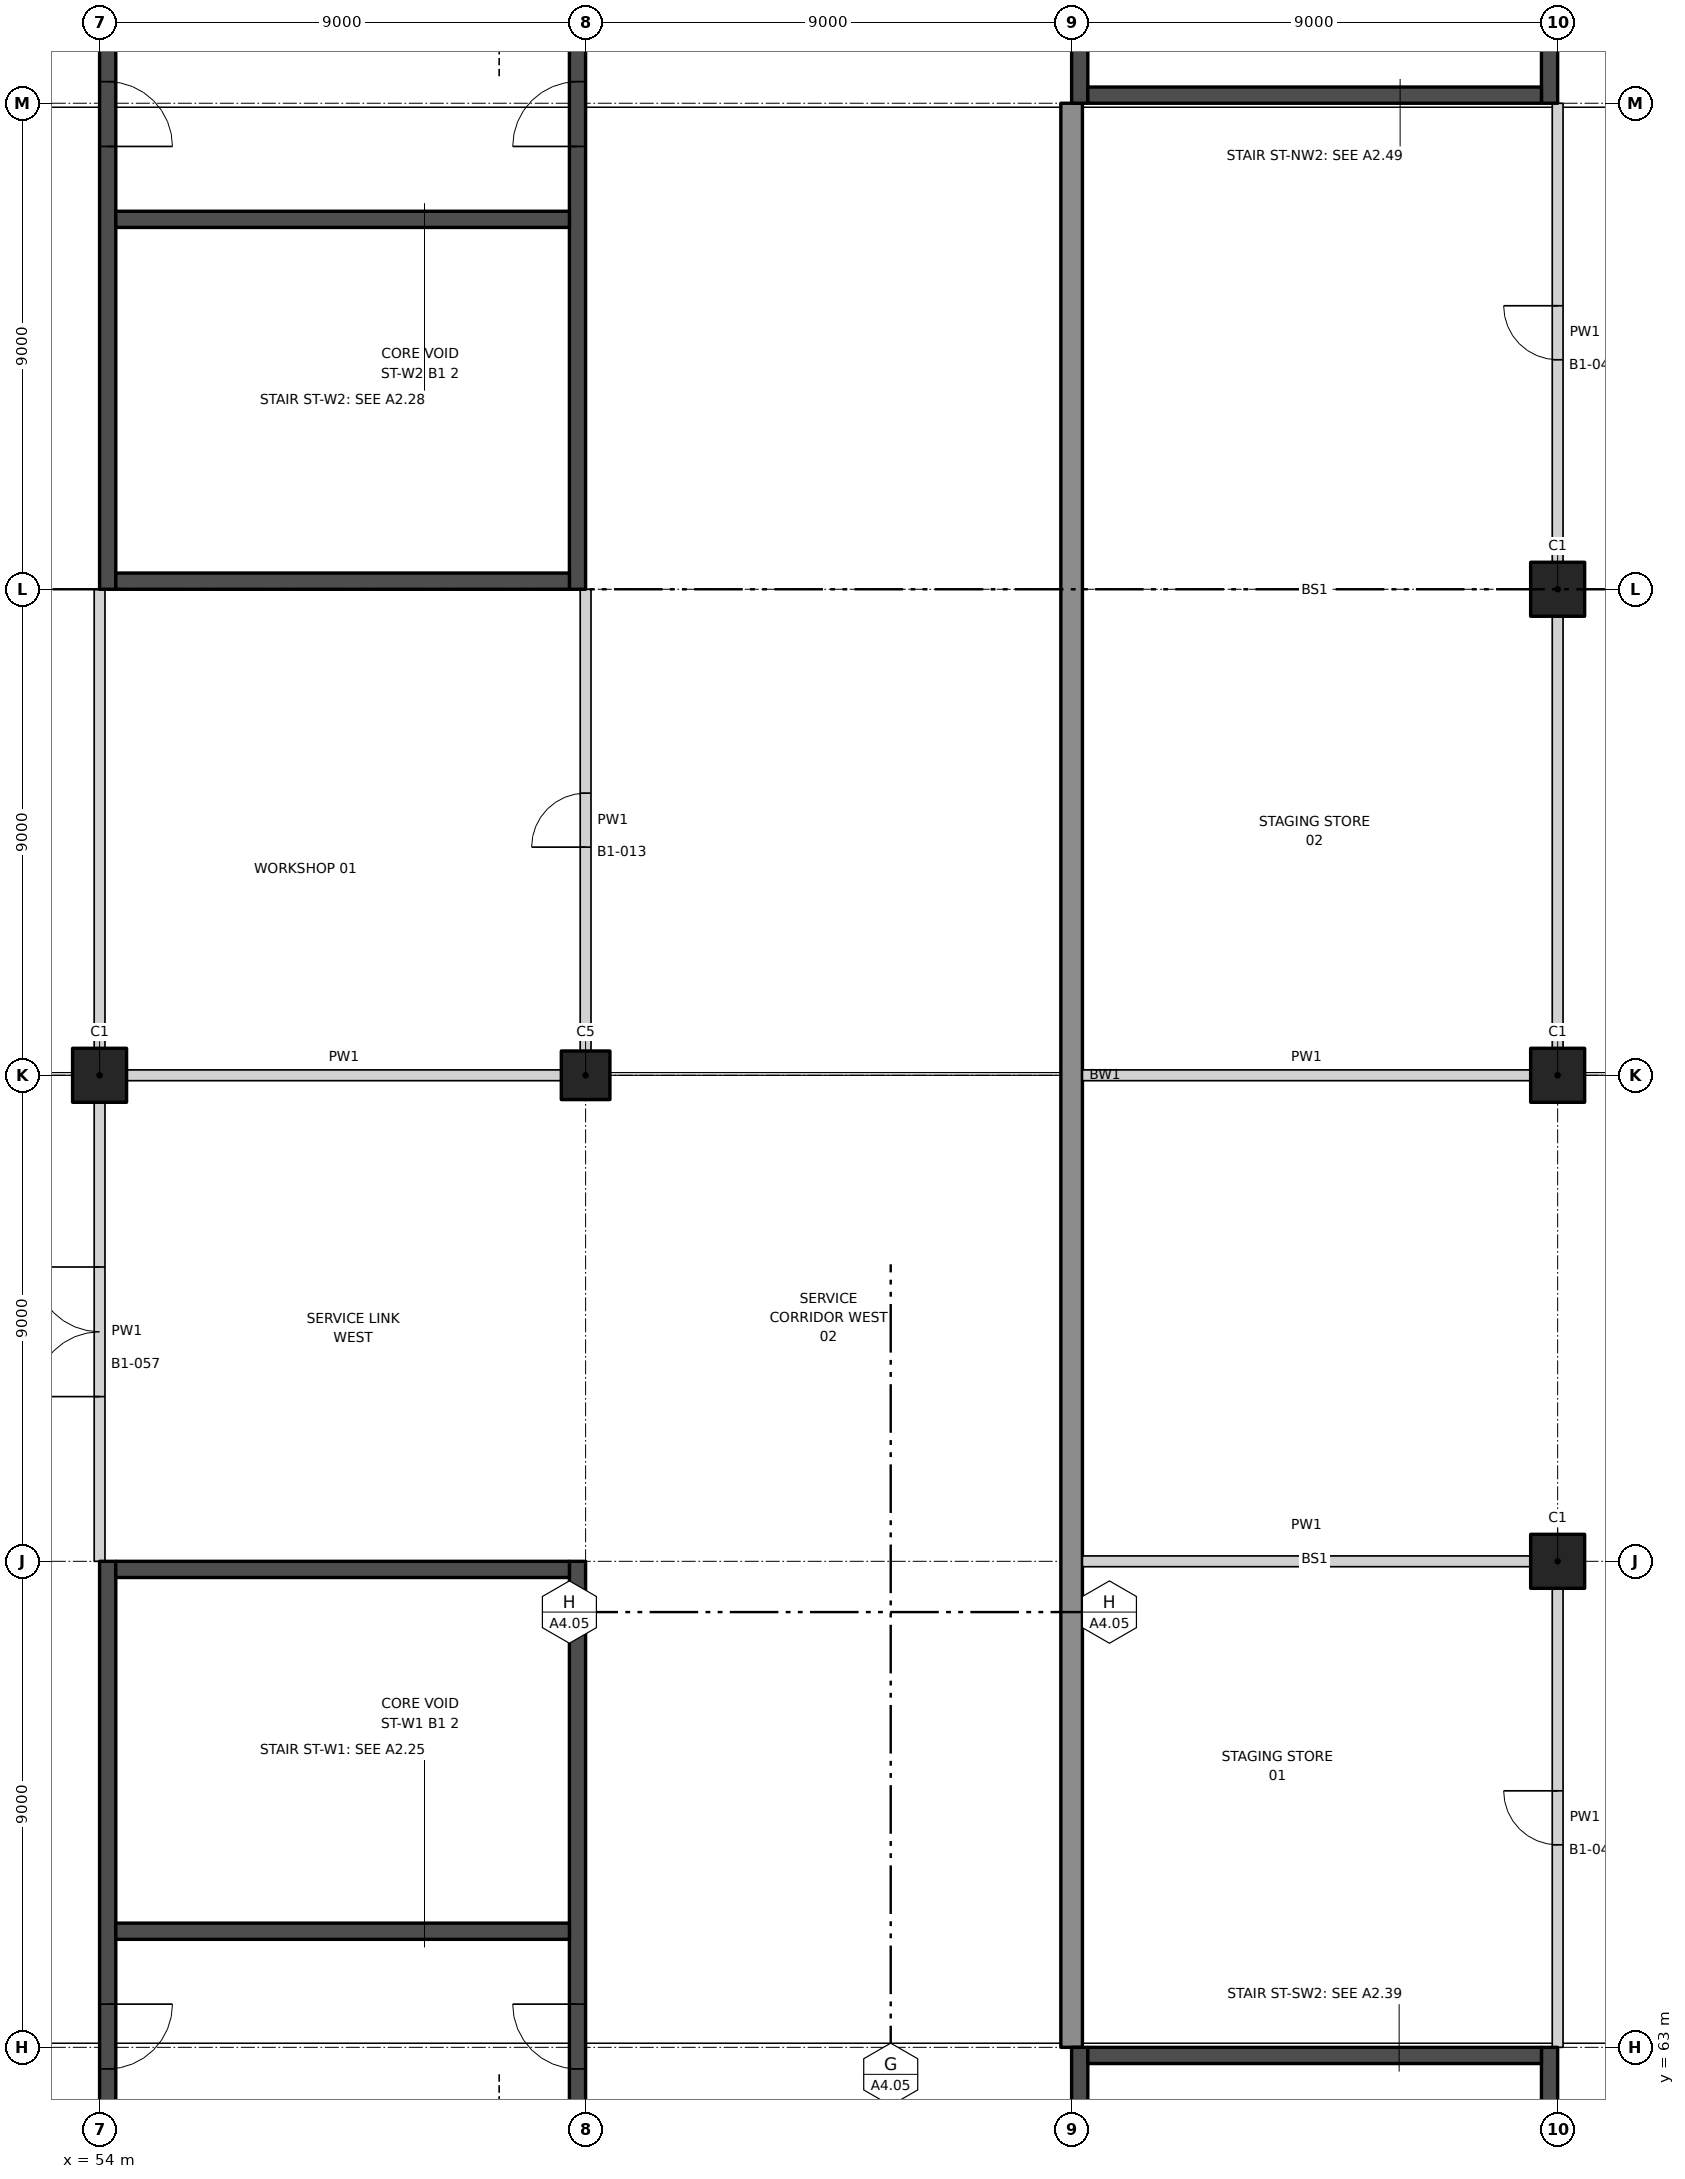
"""IFC4 building model, lengths in metres.
Left out: names, types, materials, properties, quantities, classifications, styles, units other than length and angle.
Written with IfcOpenShell. Run it as: python <this file> out.ifc"""

import sys

from ifc_helpers import new_model, si_unit, direction, frame, frame_2d, origin, origin_2d, place, context, subcontext, project, spatial, rectangle, extrude, element, fill, save


model = new_model("IFC4")
c1 = context("Model", 3, precision=1e-05, world=origin(), true_north=direction((0.0, 1.0)))
c2 = subcontext(c1, "Body", "Model", "MODEL_VIEW")
j1 = project(units=[si_unit("LENGTHUNIT", "METRE"), si_unit("PLANEANGLEUNIT", "RADIAN")], contexts=[c1])
p1 = place(None, origin())
s1 = spatial("IfcSite", under=j1, at=p1, CompositionType="ELEMENT")
p2 = place(p1, origin())
s2 = spatial("IfcBuilding", under=s1, at=p2, CompositionType="ELEMENT")
p3 = place(p2, frame((0.0, 0.0, -6.0)))
s3 = spatial("IfcBuildingStorey", under=s2, at=p3, CompositionType="ELEMENT", Elevation=-6.0)
p4 = place(p3, frame((54.0, 81.0, 0.0), z_axis=(0.0, 0.0, 1.0), x_axis=(1.0, 0.0, 0.0)))
e1 = element("IfcColumn", 1, at=p4, inside=s3, PredefinedType="COLUMN", context=c2, shape_type="SweptSolid", body=[
    extrude(rectangle(XDim=1.0, YDim=1.0, at=origin_2d()), origin(), (0.0, 0.0, 1.0), 6.0),
])
p5 = place(p3, frame((63.0, 81.0, 0.0), z_axis=(0.0, 0.0, 1.0), x_axis=(1.0, 0.0, 0.0)))
e2 = element("IfcColumn", 2, at=p5, inside=s3, PredefinedType="COLUMN", context=c2, shape_type="SweptSolid", body=[
    extrude(rectangle(XDim=0.9, YDim=0.9, at=origin_2d()), origin(), (0.0, 0.0, 1.0), 6.0),
])
for number, where, z_axis, x_axis in (
    (3, (81.0, 72.0, 0.0), (0.0, 0.0, 1.0), (1.0, 0.0, 0.0)),
    (4, (81.0, 81.0, 0.0), (0.0, 0.0, 1.0), (1.0, 0.0, 0.0)),
    (5, (81.0, 90.0, 0.0), (0.0, 0.0, 1.0), (1.0, 0.0, 0.0)),
):
    element("IfcColumn", number, at=place(p3, frame(where, z_axis=z_axis, x_axis=x_axis)), inside=s3, PredefinedType="COLUMN", context=c2, shape_type="SweptSolid", body=[
        extrude(rectangle(XDim=1.0, YDim=1.0, at=origin_2d()), origin(), (0.0, 0.0, 1.0), 6.0),
    ])
p6 = place(p3, frame((72.0, 99.0, 0.0), z_axis=(0.0, 0.0, 1.0), x_axis=(0.0, -1.0, 0.0)))
e6 = element("IfcWall", 6, at=p6, inside=s3, PredefinedType="SOLIDWALL", context=c2, shape_type="SweptSolid", body=[
    extrude(rectangle(XDim=36.0, YDim=0.4, at=frame_2d((18.0, 0.0))), origin(), (0.0, 0.0, 1.0), 6.0),
])
p7 = place(p3, frame((72.2, 72.0, 0.0), z_axis=(0.0, 0.0, 1.0), x_axis=(1.0, 0.0, 0.0)))
e7 = element("IfcWall", 7, at=p7, inside=s3, PredefinedType="PARTITIONING", context=c2, shape_type="SweptSolid", body=[
    extrude(rectangle(XDim=8.3, YDim=0.2, at=frame_2d((4.15, 0.0))), origin(), (0.0, 0.0, 1.0), 4.65),
])
p8 = place(p3, frame((54.5, 81.0, 0.0), z_axis=(0.0, 0.0, 1.0), x_axis=(1.0, 0.0, 0.0)))
e8 = element("IfcWall", 8, at=p8, inside=s3, PredefinedType="PARTITIONING", context=c2, shape_type="SweptSolid", body=[
    extrude(rectangle(XDim=8.05, YDim=0.2, at=frame_2d((4.025, 0.0))), origin(), (0.0, 0.0, 1.0), 4.65),
])
p9 = place(p3, frame((72.2, 81.0, 0.0), z_axis=(0.0, 0.0, 1.0), x_axis=(1.0, 0.0, 0.0)))
e9 = element("IfcWall", 9, at=p9, inside=s3, PredefinedType="PARTITIONING", context=c2, shape_type="SweptSolid", body=[
    extrude(rectangle(XDim=8.3, YDim=0.2, at=frame_2d((4.15, 0.0))), origin(), (0.0, 0.0, 1.0), 4.65),
])
p10 = place(p3, frame((54.0, 72.0, 0.0), z_axis=(0.0, 0.0, 1.0), x_axis=(0.0, 1.0, 0.0)))
e10 = element("IfcWall", 10, at=p10, inside=s3, PredefinedType="PARTITIONING", context=c2, shape_type="SweptSolid", body=[
    extrude(rectangle(XDim=8.5, YDim=0.2, at=frame_2d((4.25, 0.0))), origin(), (0.0, 0.0, 1.0), 4.65),
])
p11 = place(p10, frame((3.05, 0.0, 0.0)))
e11 = element("IfcOpeningElement", 11, at=p11, cuts=e10, PredefinedType="OPENING", context=c2, shape_type="SweptSolid", body=[
    extrude(rectangle(XDim=2.4, YDim=2.4, at=frame_2d((1.2, 1.2))), frame((0.0, 0.11, 0.0), z_axis=(0.0, -1.0, 0.0), x_axis=(1.0, 0.0, 0.0)), (0.0, 0.0, 1.0), 0.22),
])
p12 = place(p3, frame((54.0, 81.5, 0.0), z_axis=(0.0, 0.0, 1.0), x_axis=(0.0, 1.0, 0.0)))
e12 = element("IfcWall", 12, at=p12, inside=s3, PredefinedType="PARTITIONING", context=c2, shape_type="SweptSolid", body=[
    extrude(rectangle(XDim=8.5, YDim=0.2, at=frame_2d((4.25, 0.0))), origin(), (0.0, 0.0, 1.0), 4.65),
])
p13 = place(p3, frame((63.0, 81.45, 0.0), z_axis=(0.0, 0.0, 1.0), x_axis=(0.0, 1.0, 0.0)))
e13 = element("IfcWall", 13, at=p13, inside=s3, PredefinedType="PARTITIONING", context=c2, shape_type="SweptSolid", body=[
    extrude(rectangle(XDim=8.55, YDim=0.2, at=frame_2d((4.275, 0.0))), origin(), (0.0, 0.0, 1.0), 4.55),
])
p14 = place(p13, frame((3.775, 0.0, 0.0)))
e14 = element("IfcOpeningElement", 14, at=p14, cuts=e13, PredefinedType="OPENING", context=c2, shape_type="SweptSolid", body=[
    extrude(rectangle(XDim=1.0, YDim=2.1, at=frame_2d((0.5, 1.05))), frame((0.0, 0.11, 0.0), z_axis=(0.0, -1.0, 0.0), x_axis=(1.0, 0.0, 0.0)), (0.0, 0.0, 1.0), 0.22),
])
p15 = place(p3, frame((81.0, 63.0, 0.0), z_axis=(0.0, 0.0, 1.0), x_axis=(0.0, 1.0, 0.0)))
e15 = element("IfcWall", 15, at=p15, inside=s3, PredefinedType="PARTITIONING", context=c2, shape_type="SweptSolid", body=[
    extrude(rectangle(XDim=8.5, YDim=0.2, at=frame_2d((4.25, 0.0))), origin(), (0.0, 0.0, 1.0), 4.55),
])
p16 = place(p15, frame((3.75, 0.0, 0.0)))
e16 = element("IfcOpeningElement", 16, at=p16, cuts=e15, PredefinedType="OPENING", context=c2, shape_type="SweptSolid", body=[
    extrude(rectangle(XDim=1.0, YDim=2.1, at=frame_2d((0.5, 1.05))), frame((0.0, 0.11, 0.0), z_axis=(0.0, -1.0, 0.0), x_axis=(1.0, 0.0, 0.0)), (0.0, 0.0, 1.0), 0.22),
])
p17 = place(p3, frame((81.0, 81.5, 0.0), z_axis=(0.0, 0.0, 1.0), x_axis=(0.0, 1.0, 0.0)))
e17 = element("IfcWall", 17, at=p17, inside=s3, PredefinedType="PARTITIONING", context=c2, shape_type="SweptSolid", body=[
    extrude(rectangle(XDim=8.0, YDim=0.2, at=frame_2d((4.0, 0.0))), origin(), (0.0, 0.0, 1.0), 4.65),
])
p18 = place(p3, frame((81.0, 90.5, 0.0), z_axis=(0.0, 0.0, 1.0), x_axis=(0.0, 1.0, 0.0)))
e18 = element("IfcWall", 18, at=p18, inside=s3, PredefinedType="PARTITIONING", context=c2, shape_type="SweptSolid", body=[
    extrude(rectangle(XDim=8.5, YDim=0.2, at=frame_2d((4.25, 0.0))), origin(), (0.0, 0.0, 1.0), 4.55),
])
p19 = place(p18, frame((3.75, 0.0, 0.0)))
e19 = element("IfcOpeningElement", 19, at=p19, cuts=e18, PredefinedType="OPENING", context=c2, shape_type="SweptSolid", body=[
    extrude(rectangle(XDim=1.0, YDim=2.1, at=frame_2d((0.5, 1.05))), frame((0.0, 0.11, 0.0), z_axis=(0.0, -1.0, 0.0), x_axis=(1.0, 0.0, 0.0)), (0.0, 0.0, 1.0), 0.22),
])
p20 = place(p3, frame((62.85, 54.0, 0.0), z_axis=(0.0, 0.0, 1.0), x_axis=(0.0, 1.0, 0.0)))
e20 = element("IfcWall", 20, at=p20, inside=s3, PredefinedType="SHEAR", context=c2, shape_type="SweptSolid", body=[
    extrude(rectangle(XDim=18.0, YDim=0.3, at=frame_2d((9.0, 0.0))), origin(), (0.0, 0.0, 1.0), 6.0),
])
p21 = place(p20, frame((8.6, 0.0, 0.0)))
e21 = element("IfcOpeningElement", 21, at=p21, cuts=e20, PredefinedType="OPENING", context=c2, shape_type="SweptSolid", body=[
    extrude(rectangle(XDim=1.2, YDim=2.1, at=frame_2d((0.6, 1.05))), frame((0.0, 0.16, 0.0), z_axis=(0.0, -1.0, 0.0), x_axis=(1.0, 0.0, 0.0)), (0.0, 0.0, 1.0), 0.32),
])
p22 = place(p3, frame((54.15, 54.0, 0.0), z_axis=(0.0, 0.0, 1.0), x_axis=(0.0, 1.0, 0.0)))
e22 = element("IfcWall", 22, at=p22, inside=s3, PredefinedType="SHEAR", context=c2, shape_type="SweptSolid", body=[
    extrude(rectangle(XDim=18.0, YDim=0.3, at=frame_2d((9.0, 0.0))), origin(), (0.0, 0.0, 1.0), 6.0),
])
p23 = place(p22, frame((8.6, 0.0, 0.0)))
e23 = element("IfcOpeningElement", 23, at=p23, cuts=e22, PredefinedType="OPENING", context=c2, shape_type="SweptSolid", body=[
    extrude(rectangle(XDim=1.2, YDim=2.1, at=frame_2d((0.6, 1.05))), frame((0.0, 0.16, 0.0), z_axis=(0.0, -1.0, 0.0), x_axis=(1.0, 0.0, 0.0)), (0.0, 0.0, 1.0), 0.32),
])
for number, where, z_axis, x_axis in (
    (24, (62.7, 71.85, 0.0), (0.0, 0.0, 1.0), (-1.0, 0.0, 0.0)),
    (25, (62.7, 65.15, 0.0), (0.0, 0.0, 1.0), (-1.0, 0.0, 0.0)),
):
    element("IfcWall", number, at=place(p3, frame(where, z_axis=z_axis, x_axis=x_axis)), inside=s3, PredefinedType="SHEAR", context=c2, shape_type="SweptSolid", body=[
        extrude(rectangle(XDim=8.4, YDim=0.3, at=frame_2d((4.2, 0.0))), origin(), (0.0, 0.0, 1.0), 6.0),
    ])
p24 = place(p3, frame((62.85, 108.0, 0.0), z_axis=(0.0, 0.0, 1.0), x_axis=(0.0, -1.0, 0.0)))
e26 = element("IfcWall", 26, at=p24, inside=s3, PredefinedType="SHEAR", context=c2, shape_type="SweptSolid", body=[
    extrude(rectangle(XDim=18.0, YDim=0.3, at=frame_2d((9.0, 0.0))), origin(), (0.0, 0.0, 1.0), 6.0),
])
p25 = place(p24, frame((8.6, 0.0, 0.0)))
e27 = element("IfcOpeningElement", 27, at=p25, cuts=e26, PredefinedType="OPENING", context=c2, shape_type="SweptSolid", body=[
    extrude(rectangle(XDim=1.2, YDim=2.1, at=frame_2d((0.6, 1.05))), frame((0.0, 0.16, 0.0), z_axis=(0.0, -1.0, 0.0), x_axis=(1.0, 0.0, 0.0)), (0.0, 0.0, 1.0), 0.32),
])
p26 = place(p3, frame((54.15, 108.0, 0.0), z_axis=(0.0, 0.0, 1.0), x_axis=(0.0, -1.0, 0.0)))
e28 = element("IfcWall", 28, at=p26, inside=s3, PredefinedType="SHEAR", context=c2, shape_type="SweptSolid", body=[
    extrude(rectangle(XDim=18.0, YDim=0.3, at=frame_2d((9.0, 0.0))), origin(), (0.0, 0.0, 1.0), 6.0),
])
p27 = place(p26, frame((8.6, 0.0, 0.0)))
e29 = element("IfcOpeningElement", 29, at=p27, cuts=e28, PredefinedType="OPENING", context=c2, shape_type="SweptSolid", body=[
    extrude(rectangle(XDim=1.2, YDim=2.1, at=frame_2d((0.6, 1.05))), frame((0.0, 0.16, 0.0), z_axis=(0.0, -1.0, 0.0), x_axis=(1.0, 0.0, 0.0)), (0.0, 0.0, 1.0), 0.32),
])
for number, where, z_axis, x_axis in (
    (30, (62.7, 90.15, 0.0), (0.0, 0.0, 1.0), (-1.0, 0.0, 0.0)),
    (31, (62.7, 96.85, 0.0), (0.0, 0.0, 1.0), (-1.0, 0.0, 0.0)),
):
    element("IfcWall", number, at=place(p3, frame(where, z_axis=z_axis, x_axis=x_axis)), inside=s3, PredefinedType="SHEAR", context=c2, shape_type="SweptSolid", body=[
        extrude(rectangle(XDim=8.4, YDim=0.3, at=frame_2d((4.2, 0.0))), origin(), (0.0, 0.0, 1.0), 6.0),
    ])
p28 = place(p3, frame((80.85, 63.0, 0.0), z_axis=(0.0, 0.0, 1.0), x_axis=(0.0, -1.0, 0.0)))
e32 = element("IfcWall", 32, at=p28, inside=s3, PredefinedType="SHEAR", context=c2, shape_type="SweptSolid", body=[
    extrude(rectangle(XDim=18.0, YDim=0.3, at=frame_2d((9.0, 0.0))), origin(), (0.0, 0.0, 1.0), 6.0),
])
p29 = place(p28, frame((1.5, 0.0, 0.0)))
e33 = element("IfcOpeningElement", 33, at=p29, cuts=e32, PredefinedType="OPENING", context=c2, shape_type="SweptSolid", body=[
    extrude(rectangle(XDim=1.2, YDim=2.1, at=frame_2d((0.6, 1.05))), frame((0.0, 0.16, 0.0), z_axis=(0.0, -1.0, 0.0), x_axis=(1.0, 0.0, 0.0)), (0.0, 0.0, 1.0), 0.32),
])
p30 = place(p3, frame((72.15, 63.0, 0.0), z_axis=(0.0, 0.0, 1.0), x_axis=(0.0, -1.0, 0.0)))
e34 = element("IfcWall", 34, at=p30, inside=s3, PredefinedType="SHEAR", context=c2, shape_type="SweptSolid", body=[
    extrude(rectangle(XDim=18.0, YDim=0.3, at=frame_2d((9.0, 0.0))), origin(), (0.0, 0.0, 1.0), 6.0),
])
p31 = place(p3, frame((80.7, 62.85, 0.0), z_axis=(0.0, 0.0, 1.0), x_axis=(-1.0, 0.0, 0.0)))
e35 = element("IfcWall", 35, at=p31, inside=s3, PredefinedType="SHEAR", context=c2, shape_type="SweptSolid", body=[
    extrude(rectangle(XDim=8.4, YDim=0.3, at=frame_2d((4.2, 0.0))), origin(), (0.0, 0.0, 1.0), 6.0),
])
p32 = place(p3, frame((80.85, 99.0, 0.0), z_axis=(0.0, 0.0, 1.0), x_axis=(0.0, 1.0, 0.0)))
e36 = element("IfcWall", 36, at=p32, inside=s3, PredefinedType="SHEAR", context=c2, shape_type="SweptSolid", body=[
    extrude(rectangle(XDim=18.0, YDim=0.3, at=frame_2d((9.0, 0.0))), origin(), (0.0, 0.0, 1.0), 6.0),
])
p33 = place(p32, frame((1.5, 0.0, 0.0)))
e37 = element("IfcOpeningElement", 37, at=p33, cuts=e36, PredefinedType="OPENING", context=c2, shape_type="SweptSolid", body=[
    extrude(rectangle(XDim=1.2, YDim=2.1, at=frame_2d((0.6, 1.05))), frame((0.0, 0.16, 0.0), z_axis=(0.0, -1.0, 0.0), x_axis=(1.0, 0.0, 0.0)), (0.0, 0.0, 1.0), 0.32),
])
p34 = place(p3, frame((72.15, 99.0, 0.0), z_axis=(0.0, 0.0, 1.0), x_axis=(0.0, 1.0, 0.0)))
e38 = element("IfcWall", 38, at=p34, inside=s3, PredefinedType="SHEAR", context=c2, shape_type="SweptSolid", body=[
    extrude(rectangle(XDim=18.0, YDim=0.3, at=frame_2d((9.0, 0.0))), origin(), (0.0, 0.0, 1.0), 6.0),
])
p35 = place(p3, frame((80.7, 99.15, 0.0), z_axis=(0.0, 0.0, 1.0), x_axis=(-1.0, 0.0, 0.0)))
e39 = element("IfcWall", 39, at=p35, inside=s3, PredefinedType="SHEAR", context=c2, shape_type="SweptSolid", body=[
    extrude(rectangle(XDim=8.4, YDim=0.3, at=frame_2d((4.2, 0.0))), origin(), (0.0, 0.0, 1.0), 6.0),
])
p36 = place(p14, origin())
e40 = element("IfcDoor", 40, at=p36, inside=s3, OperationType="SINGLE_SWING_LEFT", PredefinedType="DOOR", context=c2, shape_type="SweptSolid", body=[
    extrude(rectangle(XDim=1.0, YDim=2.1, at=frame_2d((0.5, 1.05))), frame((0.0, 0.025, 0.0), z_axis=(0.0, -1.0, 0.0), x_axis=(1.0, 0.0, 0.0)), (0.0, 0.0, 1.0), 0.05),
])
fill(e14, e40)
p37 = place(p16, origin())
e41 = element("IfcDoor", 41, at=p37, inside=s3, OperationType="SINGLE_SWING_RIGHT", PredefinedType="DOOR", context=c2, shape_type="SweptSolid", body=[
    extrude(rectangle(XDim=1.0, YDim=2.1, at=frame_2d((0.5, 1.05))), frame((0.0, 0.025, 0.0), z_axis=(0.0, -1.0, 0.0), x_axis=(1.0, 0.0, 0.0)), (0.0, 0.0, 1.0), 0.05),
])
fill(e16, e41)
p38 = place(p19, origin())
e42 = element("IfcDoor", 42, at=p38, inside=s3, OperationType="SINGLE_SWING_RIGHT", PredefinedType="DOOR", context=c2, shape_type="SweptSolid", body=[
    extrude(rectangle(XDim=1.0, YDim=2.1, at=frame_2d((0.5, 1.05))), frame((0.0, 0.025, 0.0), z_axis=(0.0, -1.0, 0.0), x_axis=(1.0, 0.0, 0.0)), (0.0, 0.0, 1.0), 0.05),
])
fill(e19, e42)
p39 = place(p11, origin())
e43 = element("IfcDoor", 43, at=p39, inside=s3, OperationType="DOUBLE_DOOR_DOUBLE_SWING", PredefinedType="DOOR", context=c2, shape_type="SweptSolid", body=[
    extrude(rectangle(XDim=2.4, YDim=2.4, at=frame_2d((1.2, 1.2))), frame((0.0, 0.025, 0.0), z_axis=(0.0, -1.0, 0.0), x_axis=(1.0, 0.0, 0.0)), (0.0, 0.0, 1.0), 0.05),
])
fill(e11, e43)
p40 = place(p21, origin())
e44 = element("IfcDoor", 44, at=p40, inside=s3, OperationType="SINGLE_SWING_RIGHT", PredefinedType="DOOR", context=c2, shape_type="SweptSolid", body=[
    extrude(rectangle(XDim=1.2, YDim=2.1, at=frame_2d((0.6, 1.05))), frame((0.0, 0.025, 0.0), z_axis=(0.0, -1.0, 0.0), x_axis=(1.0, 0.0, 0.0)), (0.0, 0.0, 1.0), 0.05),
])
fill(e21, e44)
p41 = place(p23, frame((1.2, 0.0, 0.0), z_axis=(0.0, 0.0, 1.0), x_axis=(-1.0, 0.0, 0.0)))
e45 = element("IfcDoor", 45, at=p41, inside=s3, OperationType="SINGLE_SWING_LEFT", PredefinedType="DOOR", context=c2, shape_type="SweptSolid", body=[
    extrude(rectangle(XDim=1.2, YDim=2.1, at=frame_2d((0.6, 1.05))), frame((0.0, 0.025, 0.0), z_axis=(0.0, -1.0, 0.0), x_axis=(1.0, 0.0, 0.0)), (0.0, 0.0, 1.0), 0.05),
])
fill(e23, e45)
p42 = place(p25, frame((1.2, 0.0, 0.0), z_axis=(0.0, 0.0, 1.0), x_axis=(-1.0, 0.0, 0.0)))
e46 = element("IfcDoor", 46, at=p42, inside=s3, OperationType="SINGLE_SWING_LEFT", PredefinedType="DOOR", context=c2, shape_type="SweptSolid", body=[
    extrude(rectangle(XDim=1.2, YDim=2.1, at=frame_2d((0.6, 1.05))), frame((0.0, 0.025, 0.0), z_axis=(0.0, -1.0, 0.0), x_axis=(1.0, 0.0, 0.0)), (0.0, 0.0, 1.0), 0.05),
])
fill(e27, e46)
p43 = place(p27, origin())
e47 = element("IfcDoor", 47, at=p43, inside=s3, OperationType="SINGLE_SWING_RIGHT", PredefinedType="DOOR", context=c2, shape_type="SweptSolid", body=[
    extrude(rectangle(XDim=1.2, YDim=2.1, at=frame_2d((0.6, 1.05))), frame((0.0, 0.025, 0.0), z_axis=(0.0, -1.0, 0.0), x_axis=(1.0, 0.0, 0.0)), (0.0, 0.0, 1.0), 0.05),
])
fill(e29, e47)
save(model, sys.argv[1])
